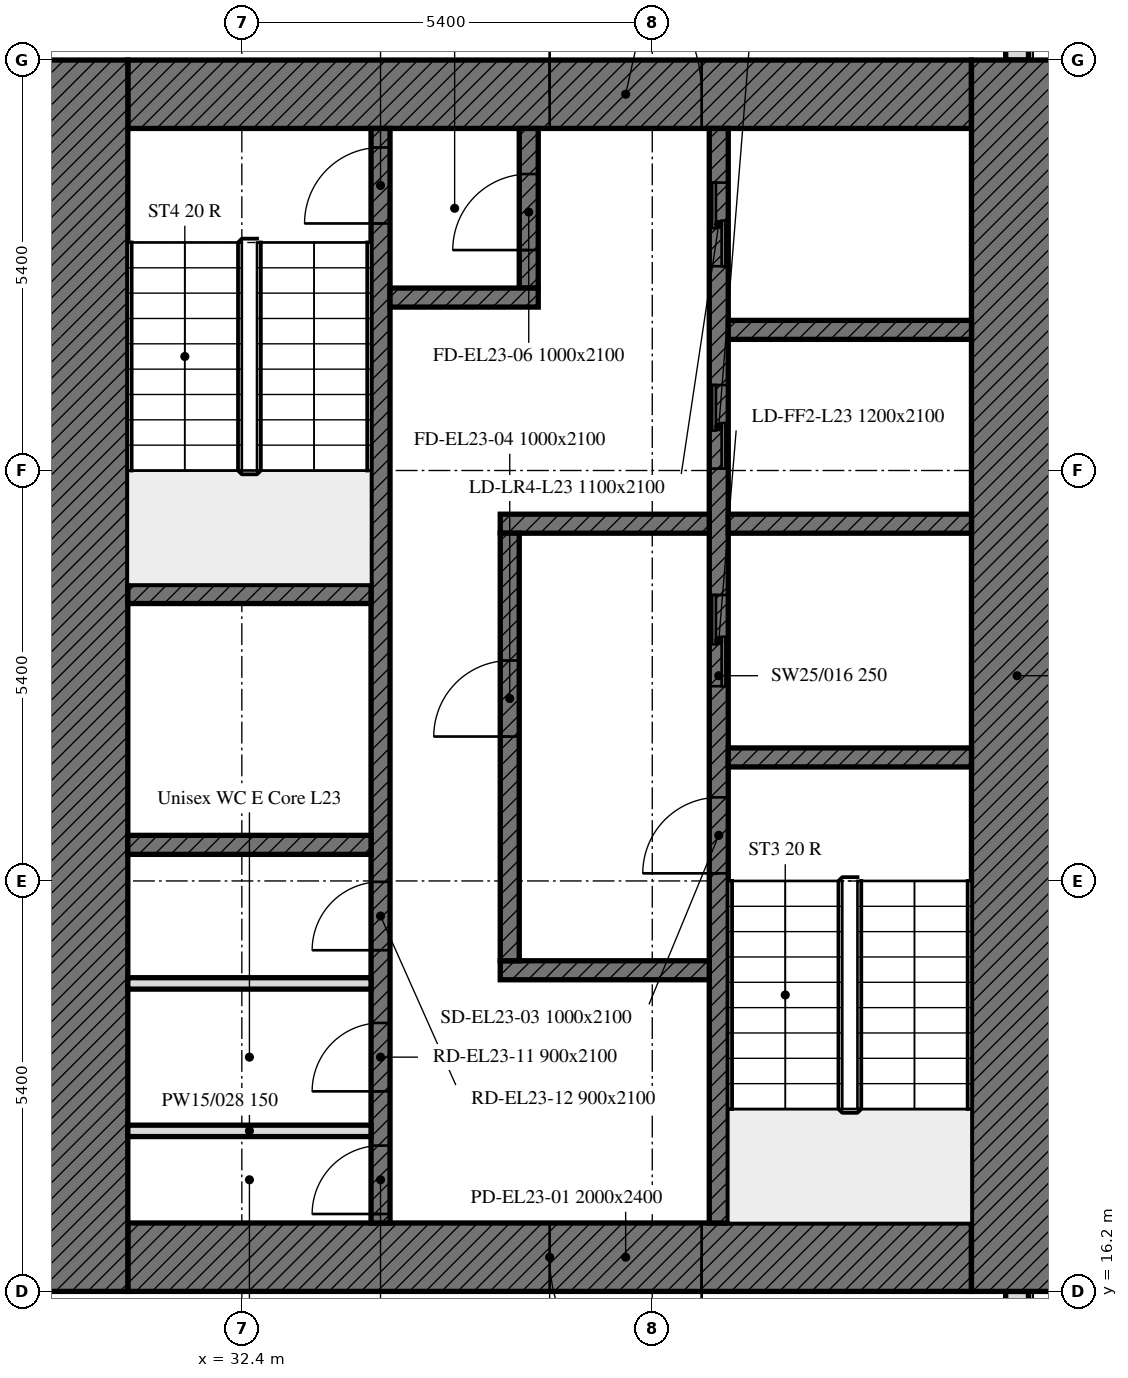
"""IFC4 building model, lengths in metres.
Left out: names, types, materials, properties, quantities, classifications, styles, units other than length and angle.
Written with IfcOpenShell. Run it as: python <this file> out.ifc"""

import sys

from ifc_helpers import new_model, si_unit, direction, frame, frame_2d, origin, place, context, subcontext, project, spatial, rectangle, extrude, element, fill, save


model = new_model("IFC4")
c1 = context("Model", 3, precision=1e-05, world=origin(), true_north=direction((0.0, 1.0)))
c2 = subcontext(c1, "Body", "Model", "MODEL_VIEW")
j1 = project(units=[si_unit("LENGTHUNIT", "METRE"), si_unit("PLANEANGLEUNIT", "RADIAN")], contexts=[c1])
p1 = place(None, origin())
s1 = spatial("IfcSite", under=j1, at=p1, CompositionType="ELEMENT")
p2 = place(p1, origin())
s2 = spatial("IfcBuilding", under=s1, at=p2, CompositionType="ELEMENT")
p3 = place(p2, frame((0.0, 0.0, 99.2)))
s3 = spatial("IfcBuildingStorey", under=s2, at=p3, CompositionType="ELEMENT", Elevation=99.2)
p4 = place(p3, frame((42.6, 10.986, 0.0), z_axis=(0.0, 0.0, 1.0), x_axis=(0.0, 1.0, 0.0)))
e1 = element("IfcWall", 1, at=p4, inside=s3, PredefinedType="SOLIDWALL", context=c2, shape_type="SweptSolid", body=[
    extrude(rectangle(XDim=5.214, YDim=0.3, at=frame_2d((2.607, 0.0))), origin(), (0.0, 0.0, 1.0), 3.5),
])
p5 = place(p3, frame((42.6, 32.4, 0.0), z_axis=(0.0, 0.0, 1.0), x_axis=(0.0, 1.0, 0.0)))
e2 = element("IfcWall", 2, at=p5, inside=s3, PredefinedType="SOLIDWALL", context=c2, shape_type="SweptSolid", body=[
    extrude(rectangle(XDim=10.614, YDim=0.3, at=frame_2d((5.307, 0.0))), origin(), (0.0, 0.0, 1.0), 3.5),
])
p6 = place(p5, frame((6.4, 0.0, 0.9)))
e3 = element("IfcOpeningElement", 3, at=p6, cuts=e2, PredefinedType="OPENING", context=c2, shape_type="SweptSolid", body=[
    extrude(rectangle(XDim=3.4, YDim=1.7, at=frame_2d((1.7, 0.85))), frame((0.0, 0.16, 0.0), z_axis=(0.0, -1.0, 0.0), x_axis=(1.0, 0.0, 0.0)), (0.0, 0.0, 1.0), 0.32),
])
p7 = place(p3, frame((42.0, 16.65, 0.0), z_axis=(0.0, 0.0, 1.0), x_axis=(-1.0, 0.0, 0.0)))
e4 = element("IfcWall", 4, at=p7, inside=s3, PredefinedType="SOLIDWALL", context=c2, shape_type="SweptSolid", body=[
    extrude(rectangle(XDim=11.1, YDim=0.9, at=frame_2d((5.55, 0.0))), origin(), (0.0, 0.0, 1.0), 3.5),
])
p8 = place(p7, frame((3.55, 0.0, 0.0)))
e5 = element("IfcOpeningElement", 5, at=p8, cuts=e4, PredefinedType="OPENING", context=c2, shape_type="SweptSolid", body=[
    extrude(rectangle(XDim=2.0, YDim=2.4, at=frame_2d((1.0, 1.2))), frame((0.0, 0.45, 0.0), z_axis=(0.0, -1.0, 0.0), x_axis=(1.0, 0.0, 0.0)), (0.0, 0.0, 1.0), 0.9),
])
p9 = place(p3, frame((30.9, 31.95, 0.0), z_axis=(0.0, 0.0, 1.0), x_axis=(1.0, 0.0, 0.0)))
e6 = element("IfcWall", 6, at=p9, inside=s3, PredefinedType="SOLIDWALL", context=c2, shape_type="SweptSolid", body=[
    extrude(rectangle(XDim=11.1, YDim=0.9, at=frame_2d((5.55, 0.0))), origin(), (0.0, 0.0, 1.0), 3.5),
])
p10 = place(p9, frame((5.55, 0.0, 0.0)))
e7 = element("IfcOpeningElement", 7, at=p10, cuts=e6, PredefinedType="OPENING", context=c2, shape_type="SweptSolid", body=[
    extrude(rectangle(XDim=2.0, YDim=2.4, at=frame_2d((1.0, 1.2))), frame((0.0, 0.45, 0.0), z_axis=(0.0, -1.0, 0.0), x_axis=(1.0, 0.0, 0.0)), (0.0, 0.0, 1.0), 0.9),
])
for number, where, z_axis, x_axis in (
    (8, (42.6, 32.4, 0.0), (0.0, 0.0, 1.0), (0.0, -1.0, 0.0)),
    (9, (30.3, 16.2, 0.0), (0.0, 0.0, 1.0), (0.0, 1.0, 0.0)),
):
    element("IfcWall", number, at=place(p3, frame(where, z_axis=z_axis, x_axis=x_axis)), inside=s3, PredefinedType="SOLIDWALL", context=c2, shape_type="SweptSolid", body=[
        extrude(rectangle(XDim=16.2, YDim=1.2, at=frame_2d((8.1, 0.0))), origin(), (0.0, 0.0, 1.0), 3.5),
    ])
p11 = place(p3, frame((38.675, 17.1, 0.0), z_axis=(0.0, 0.0, 1.0), x_axis=(0.0, 1.0, 0.0)))
e10 = element("IfcWall", 10, at=p11, inside=s3, PredefinedType="SOLIDWALL", context=c2, shape_type="SweptSolid", body=[
    extrude(rectangle(XDim=14.4, YDim=0.25, at=frame_2d((7.2, 0.0))), origin(), (0.0, 0.0, 1.0), 3.5),
])
p12 = place(p11, frame((4.6, 0.0, 0.0)))
e11 = element("IfcOpeningElement", 11, at=p12, cuts=e10, PredefinedType="OPENING", context=c2, shape_type="SweptSolid", body=[
    extrude(rectangle(XDim=1.0, YDim=2.1, at=frame_2d((0.5, 1.05))), frame((0.0, 0.125, 0.0), z_axis=(0.0, -1.0, 0.0), x_axis=(1.0, 0.0, 0.0)), (0.0, 0.0, 1.0), 0.25),
])
p13 = place(p11, frame((7.062, 0.0, 0.0)))
e12 = element("IfcOpeningElement", 12, at=p13, cuts=e10, PredefinedType="OPENING", context=c2, shape_type="SweptSolid", body=[
    extrude(rectangle(XDim=1.2, YDim=2.1, at=frame_2d((0.6, 1.05))), frame((0.0, 0.125, 0.0), z_axis=(0.0, -1.0, 0.0), x_axis=(1.0, 0.0, 0.0)), (0.0, 0.0, 1.0), 0.25),
])
p14 = place(p11, frame((9.925, 0.0, 0.0)))
e13 = element("IfcOpeningElement", 13, at=p14, cuts=e10, PredefinedType="OPENING", context=c2, shape_type="SweptSolid", body=[
    extrude(rectangle(XDim=1.1, YDim=2.1, at=frame_2d((0.55, 1.05))), frame((0.0, 0.125, 0.0), z_axis=(0.0, -1.0, 0.0), x_axis=(1.0, 0.0, 0.0)), (0.0, 0.0, 1.0), 0.25),
])
p15 = place(p11, frame((12.587, 0.0, 0.0)))
e14 = element("IfcOpeningElement", 14, at=p15, cuts=e10, PredefinedType="OPENING", context=c2, shape_type="SweptSolid", body=[
    extrude(rectangle(XDim=1.1, YDim=2.1, at=frame_2d((0.55, 1.05))), frame((0.0, 0.125, 0.0), z_axis=(0.0, -1.0, 0.0), x_axis=(1.0, 0.0, 0.0)), (0.0, 0.0, 1.0), 0.25),
])
p16 = place(p3, frame((34.225, 17.1, 0.0), z_axis=(0.0, 0.0, 1.0), x_axis=(0.0, 1.0, 0.0)))
e15 = element("IfcWall", 15, at=p16, inside=s3, PredefinedType="SOLIDWALL", context=c2, shape_type="SweptSolid", body=[
    extrude(rectangle(XDim=14.4, YDim=0.25, at=frame_2d((7.2, 0.0))), origin(), (0.0, 0.0, 1.0), 3.5),
])
p17 = place(p16, frame((13.15, 0.0, 0.0)))
e16 = element("IfcOpeningElement", 16, at=p17, cuts=e15, PredefinedType="OPENING", context=c2, shape_type="SweptSolid", body=[
    extrude(rectangle(XDim=1.0, YDim=2.1, at=frame_2d((0.5, 1.05))), frame((0.0, 0.125, 0.0), z_axis=(0.0, -1.0, 0.0), x_axis=(1.0, 0.0, 0.0)), (0.0, 0.0, 1.0), 0.25),
])
p18 = place(p16, frame((0.118, 0.0, 0.0)))
e17 = element("IfcOpeningElement", 17, at=p18, cuts=e15, PredefinedType="OPENING", context=c2, shape_type="SweptSolid", body=[
    extrude(rectangle(XDim=0.9, YDim=2.1, at=frame_2d((0.45, 1.05))), frame((0.0, 0.125, 0.0), z_axis=(0.0, -1.0, 0.0), x_axis=(1.0, 0.0, 0.0)), (0.0, 0.0, 1.0), 0.25),
])
p19 = place(p16, frame((1.732, 0.0, 0.0)))
e18 = element("IfcOpeningElement", 18, at=p19, cuts=e15, PredefinedType="OPENING", context=c2, shape_type="SweptSolid", body=[
    extrude(rectangle(XDim=0.9, YDim=2.1, at=frame_2d((0.45, 1.05))), frame((0.0, 0.125, 0.0), z_axis=(0.0, -1.0, 0.0), x_axis=(1.0, 0.0, 0.0)), (0.0, 0.0, 1.0), 0.25),
])
p20 = place(p16, frame((3.588, 0.0, 0.0)))
e19 = element("IfcOpeningElement", 19, at=p20, cuts=e15, PredefinedType="OPENING", context=c2, shape_type="SweptSolid", body=[
    extrude(rectangle(XDim=0.9, YDim=2.1, at=frame_2d((0.45, 1.05))), frame((0.0, 0.125, 0.0), z_axis=(0.0, -1.0, 0.0), x_axis=(1.0, 0.0, 0.0)), (0.0, 0.0, 1.0), 0.25),
])
p21 = place(p3, frame((38.8, 23.225, 0.0), z_axis=(0.0, 0.0, 1.0), x_axis=(1.0, 0.0, 0.0)))
e20 = element("IfcWall", 20, at=p21, inside=s3, PredefinedType="SOLIDWALL", context=c2, shape_type="SweptSolid", body=[
    extrude(rectangle(XDim=3.2, YDim=0.25, at=frame_2d((1.6, 0.0))), origin(), (0.0, 0.0, 1.0), 3.5),
])
for number, where, z_axis, x_axis in (
    (21, (30.9, 25.375, 0.0), (0.0, 0.0, 1.0), (1.0, 0.0, 0.0)),
    (22, (30.9, 22.075, 0.0), (0.0, 0.0, 1.0), (1.0, 0.0, 0.0)),
):
    element("IfcWall", number, at=place(p3, frame(where, z_axis=z_axis, x_axis=x_axis)), inside=s3, PredefinedType="SOLIDWALL", context=c2, shape_type="SweptSolid", body=[
        extrude(rectangle(XDim=3.2, YDim=0.25, at=frame_2d((1.6, 0.0))), origin(), (0.0, 0.0, 1.0), 3.5),
    ])
p22 = place(p3, frame((38.8, 26.3, 0.0), z_axis=(0.0, 0.0, 1.0), x_axis=(1.0, 0.0, 0.0)))
e23 = element("IfcWall", 23, at=p22, inside=s3, PredefinedType="SOLIDWALL", context=c2, shape_type="SweptSolid", body=[
    extrude(rectangle(XDim=3.2, YDim=0.25, at=frame_2d((1.6, 0.0))), origin(), (0.0, 0.0, 1.0), 3.5),
])
for number, where, z_axis, x_axis in (
    (24, (35.8, 26.3, 0.0), (0.0, 0.0, 1.0), (1.0, 0.0, 0.0)),
    (25, (35.8, 20.425, 0.0), (0.0, 0.0, 1.0), (1.0, 0.0, 0.0)),
):
    element("IfcWall", number, at=place(p3, frame(where, z_axis=z_axis, x_axis=x_axis)), inside=s3, PredefinedType="SOLIDWALL", context=c2, shape_type="SweptSolid", body=[
        extrude(rectangle(XDim=2.75, YDim=0.25, at=frame_2d((1.375, 0.0))), origin(), (0.0, 0.0, 1.0), 3.5),
    ])
p23 = place(p3, frame((36.175, 29.4, 0.0), z_axis=(0.0, 0.0, 1.0), x_axis=(0.0, 1.0, 0.0)))
e26 = element("IfcWall", 26, at=p23, inside=s3, PredefinedType="SOLIDWALL", context=c2, shape_type="SweptSolid", body=[
    extrude(rectangle(XDim=2.1, YDim=0.25, at=frame_2d((1.05, 0.0))), origin(), (0.0, 0.0, 1.0), 3.5),
])
p24 = place(p23, frame((0.5, 0.0, 0.0)))
e27 = element("IfcOpeningElement", 27, at=p24, cuts=e26, PredefinedType="OPENING", context=c2, shape_type="SweptSolid", body=[
    extrude(rectangle(XDim=1.0, YDim=2.1, at=frame_2d((0.5, 1.05))), frame((0.0, 0.125, 0.0), z_axis=(0.0, -1.0, 0.0), x_axis=(1.0, 0.0, 0.0)), (0.0, 0.0, 1.0), 0.25),
])
p25 = place(p3, frame((34.35, 29.275, 0.0), z_axis=(0.0, 0.0, 1.0), x_axis=(1.0, 0.0, 0.0)))
e28 = element("IfcWall", 28, at=p25, inside=s3, PredefinedType="SOLIDWALL", context=c2, shape_type="SweptSolid", body=[
    extrude(rectangle(XDim=1.95, YDim=0.25, at=frame_2d((0.975, 0.0))), origin(), (0.0, 0.0, 1.0), 3.5),
])
p26 = place(p3, frame((35.925, 20.55, 0.0), z_axis=(0.0, 0.0, 1.0), x_axis=(0.0, 1.0, 0.0)))
e29 = element("IfcWall", 29, at=p26, inside=s3, PredefinedType="SOLIDWALL", context=c2, shape_type="SweptSolid", body=[
    extrude(rectangle(XDim=5.625, YDim=0.25, at=frame_2d((2.812, 0.0))), origin(), (0.0, 0.0, 1.0), 3.5),
])
p27 = place(p26, frame((2.95, 0.0, 0.0)))
e30 = element("IfcOpeningElement", 30, at=p27, cuts=e29, PredefinedType="OPENING", context=c2, shape_type="SweptSolid", body=[
    extrude(rectangle(XDim=1.0, YDim=2.1, at=frame_2d((0.5, 1.05))), frame((0.0, 0.125, 0.0), z_axis=(0.0, -1.0, 0.0), x_axis=(1.0, 0.0, 0.0)), (0.0, 0.0, 1.0), 0.25),
])
p28 = place(p3, frame((38.8, 28.85, 0.0), z_axis=(0.0, 0.0, 1.0), x_axis=(1.0, 0.0, 0.0)))
e31 = element("IfcWall", 31, at=p28, inside=s3, PredefinedType="SOLIDWALL", context=c2, shape_type="SweptSolid", body=[
    extrude(rectangle(XDim=3.2, YDim=0.25, at=frame_2d((1.6, 0.0))), origin(), (0.0, 0.0, 1.0), 3.5),
])
for number, where, z_axis, x_axis in (
    (32, (30.9, 18.312, 0.0), (0.0, 0.0, 1.0), (1.0, 0.0, 0.0)),
    (33, (30.9, 20.252, 0.0), (0.0, 0.0, 1.0), (1.0, 0.0, 0.0)),
):
    element("IfcWall", number, at=place(p3, frame(where, z_axis=z_axis, x_axis=x_axis)), inside=s3, PredefinedType="PARTITIONING", context=c2, shape_type="SweptSolid", body=[
        extrude(rectangle(XDim=3.2, YDim=0.15, at=frame_2d((1.6, 0.0))), origin(), (0.0, 0.0, 1.0), 3.5),
    ])
p29 = place(p8, origin())
e34 = element("IfcDoor", 34, at=p29, inside=s3, OperationType="DOUBLE_DOOR_SINGLE_SWING", PredefinedType="DOOR", context=c2, shape_type="SweptSolid", body=[
    extrude(rectangle(XDim=2.0, YDim=2.4, at=frame_2d((1.0, 1.2))), frame((0.0, 0.025, 0.0), z_axis=(0.0, -1.0, 0.0), x_axis=(1.0, 0.0, 0.0)), (0.0, 0.0, 1.0), 0.05),
])
fill(e5, e34)
p30 = place(p10, origin())
e35 = element("IfcDoor", 35, at=p30, inside=s3, OperationType="DOUBLE_DOOR_SINGLE_SWING", PredefinedType="DOOR", context=c2, shape_type="SweptSolid", body=[
    extrude(rectangle(XDim=2.0, YDim=2.4, at=frame_2d((1.0, 1.2))), frame((0.0, 0.025, 0.0), z_axis=(0.0, -1.0, 0.0), x_axis=(1.0, 0.0, 0.0)), (0.0, 0.0, 1.0), 0.05),
])
fill(e7, e35)
p31 = place(p12, origin())
e36 = element("IfcDoor", 36, at=p31, inside=s3, OperationType="SINGLE_SWING_LEFT", PredefinedType="DOOR", context=c2, shape_type="SweptSolid", body=[
    extrude(rectangle(XDim=1.0, YDim=2.1, at=frame_2d((0.5, 1.05))), frame((0.0, 0.025, 0.0), z_axis=(0.0, -1.0, 0.0), x_axis=(1.0, 0.0, 0.0)), (0.0, 0.0, 1.0), 0.05),
])
fill(e11, e36)
p32 = place(p27, origin())
e37 = element("IfcDoor", 37, at=p32, inside=s3, OperationType="SINGLE_SWING_LEFT", PredefinedType="DOOR", context=c2, shape_type="SweptSolid", body=[
    extrude(rectangle(XDim=1.0, YDim=2.1, at=frame_2d((0.5, 1.05))), frame((0.0, 0.025, 0.0), z_axis=(0.0, -1.0, 0.0), x_axis=(1.0, 0.0, 0.0)), (0.0, 0.0, 1.0), 0.05),
])
fill(e30, e37)
p33 = place(p17, origin())
e38 = element("IfcDoor", 38, at=p33, inside=s3, OperationType="SINGLE_SWING_LEFT", PredefinedType="DOOR", context=c2, shape_type="SweptSolid", body=[
    extrude(rectangle(XDim=1.0, YDim=2.1, at=frame_2d((0.5, 1.05))), frame((0.0, 0.025, 0.0), z_axis=(0.0, -1.0, 0.0), x_axis=(1.0, 0.0, 0.0)), (0.0, 0.0, 1.0), 0.05),
])
fill(e16, e38)
p34 = place(p24, origin())
e39 = element("IfcDoor", 39, at=p34, inside=s3, OperationType="SINGLE_SWING_LEFT", PredefinedType="DOOR", context=c2, shape_type="SweptSolid", body=[
    extrude(rectangle(XDim=1.0, YDim=2.1, at=frame_2d((0.5, 1.05))), frame((0.0, 0.025, 0.0), z_axis=(0.0, -1.0, 0.0), x_axis=(1.0, 0.0, 0.0)), (0.0, 0.0, 1.0), 0.05),
])
fill(e27, e39)
p35 = place(p13, origin())
e40 = element("IfcDoor", 40, at=p35, inside=s3, OperationType="DOUBLE_DOOR_SLIDING", PredefinedType="DOOR", context=c2, shape_type="SweptSolid", body=[
    extrude(rectangle(XDim=1.2, YDim=2.1, at=frame_2d((0.6, 1.05))), frame((0.0, 0.025, 0.0), z_axis=(0.0, -1.0, 0.0), x_axis=(1.0, 0.0, 0.0)), (0.0, 0.0, 1.0), 0.05),
])
fill(e12, e40)
p36 = place(p14, origin())
e41 = element("IfcDoor", 41, at=p36, inside=s3, OperationType="DOUBLE_DOOR_SLIDING", PredefinedType="DOOR", context=c2, shape_type="SweptSolid", body=[
    extrude(rectangle(XDim=1.1, YDim=2.1, at=frame_2d((0.55, 1.05))), frame((0.0, 0.025, 0.0), z_axis=(0.0, -1.0, 0.0), x_axis=(1.0, 0.0, 0.0)), (0.0, 0.0, 1.0), 0.05),
])
fill(e13, e41)
p37 = place(p15, origin())
e42 = element("IfcDoor", 42, at=p37, inside=s3, OperationType="DOUBLE_DOOR_SLIDING", PredefinedType="DOOR", context=c2, shape_type="SweptSolid", body=[
    extrude(rectangle(XDim=1.1, YDim=2.1, at=frame_2d((0.55, 1.05))), frame((0.0, 0.025, 0.0), z_axis=(0.0, -1.0, 0.0), x_axis=(1.0, 0.0, 0.0)), (0.0, 0.0, 1.0), 0.05),
])
fill(e14, e42)
p38 = place(p18, origin())
e43 = element("IfcDoor", 43, at=p38, inside=s3, OperationType="SINGLE_SWING_LEFT", PredefinedType="DOOR", context=c2, shape_type="SweptSolid", body=[
    extrude(rectangle(XDim=0.9, YDim=2.1, at=frame_2d((0.45, 1.05))), frame((0.0, 0.025, 0.0), z_axis=(0.0, -1.0, 0.0), x_axis=(1.0, 0.0, 0.0)), (0.0, 0.0, 1.0), 0.05),
])
fill(e17, e43)
p39 = place(p19, origin())
e44 = element("IfcDoor", 44, at=p39, inside=s3, OperationType="SINGLE_SWING_LEFT", PredefinedType="DOOR", context=c2, shape_type="SweptSolid", body=[
    extrude(rectangle(XDim=0.9, YDim=2.1, at=frame_2d((0.45, 1.05))), frame((0.0, 0.025, 0.0), z_axis=(0.0, -1.0, 0.0), x_axis=(1.0, 0.0, 0.0)), (0.0, 0.0, 1.0), 0.05),
])
fill(e18, e44)
p40 = place(p20, origin())
e45 = element("IfcDoor", 45, at=p40, inside=s3, OperationType="SINGLE_SWING_LEFT", PredefinedType="DOOR", context=c2, shape_type="SweptSolid", body=[
    extrude(rectangle(XDim=0.9, YDim=2.1, at=frame_2d((0.45, 1.05))), frame((0.0, 0.025, 0.0), z_axis=(0.0, -1.0, 0.0), x_axis=(1.0, 0.0, 0.0)), (0.0, 0.0, 1.0), 0.05),
])
fill(e19, e45)
save(model, sys.argv[1])
